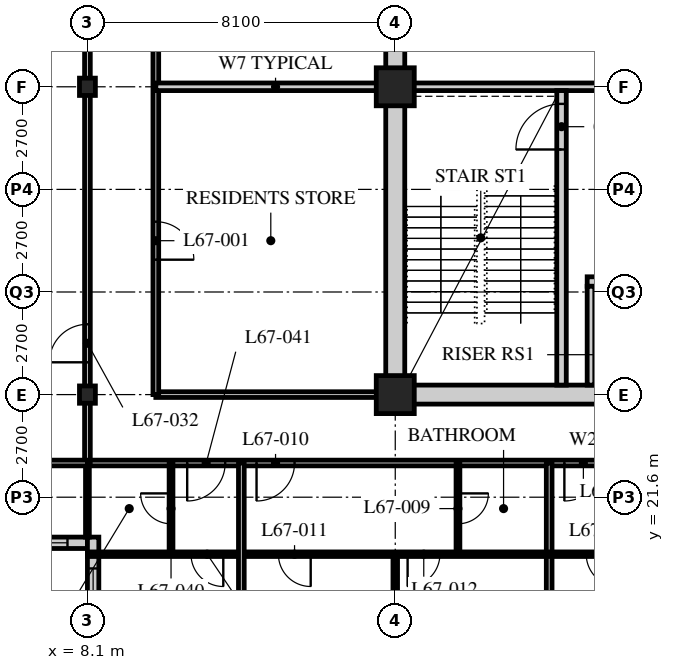
"""IFC4 building model, lengths in metres.
Left out: names, types, materials, properties, quantities, classifications, styles, units other than length and angle.
Written with IfcOpenShell. Run it as: python <this file> out.ifc"""

import sys

from ifc_helpers import new_model, si_unit, direction, frame, frame_2d, origin, origin_2d, place, context, subcontext, project, spatial, rectangle, hollow_rectangle, i_section, extrude, element, fill, save


model = new_model("IFC4")
c1 = context("Model", 3, precision=1e-05, world=origin(), true_north=direction((0.0, 1.0)))
c2 = subcontext(c1, "Body", "Model", "MODEL_VIEW")
j1 = project(units=[si_unit("LENGTHUNIT", "METRE"), si_unit("PLANEANGLEUNIT", "RADIAN")], contexts=[c1])
p1 = place(None, origin())
s1 = spatial("IfcSite", under=j1, at=p1, CompositionType="ELEMENT")
p2 = place(p1, origin())
s2 = spatial("IfcBuilding", under=s1, at=p2, CompositionType="ELEMENT")
p3 = place(p2, frame((0.0, 0.0, 261.9)))
s3 = spatial("IfcBuildingStorey", under=s2, at=p3, CompositionType="ELEMENT", Elevation=261.9)
for number, where, z_axis, x_axis in (
    (1, (8.1, 24.3, 0.0), (0.0, 0.0, 1.0), (1.0, 0.0, 0.0)),
    (2, (8.1, 32.4, 0.0), (0.0, 0.0, 1.0), (1.0, 0.0, 0.0)),
):
    element("IfcColumn", number, at=place(p3, frame(where, z_axis=z_axis, x_axis=x_axis)), inside=s3, PredefinedType="COLUMN", context=c2, shape_type="SweptSolid", body=[
        extrude(i_section(OverallWidth=0.418, OverallDepth=0.456, WebThickness=0.042, FlangeThickness=0.067, FilletRadius=0.015, at=origin_2d()), origin(), (0.0, 0.0, 1.0), 3.9),
    ])
for number, where, z_axis, x_axis in (
    (3, (16.2, 24.3, 0.0), (0.0, 0.0, 1.0), (1.0, 0.0, 0.0)),
    (4, (16.2, 32.4, 0.0), (0.0, 0.0, 1.0), (1.0, 0.0, 0.0)),
):
    element("IfcColumn", number, at=place(p3, frame(where, z_axis=z_axis, x_axis=x_axis)), inside=s3, PredefinedType="COLUMN", context=c2, shape_type="SweptSolid", body=[
        extrude(hollow_rectangle(XDim=1.0, YDim=1.0, WallThickness=0.1, at=origin_2d()), origin(), (0.0, 0.0, 1.0), 3.9),
    ])
p4 = place(p3, frame((4.35, 20.4, 0.0), z_axis=(0.0, 0.0, 1.0), x_axis=(1.0, 0.0, 0.0)))
e5 = element("IfcWall", 5, at=p4, inside=s3, PredefinedType="SOLIDWALL", context=c2, shape_type="SweptSolid", body=[
    extrude(rectangle(XDim=3.75, YDim=0.3, at=frame_2d((1.875, 0.0))), origin(), (0.0, 0.0, 1.0), 3.69),
])
p5 = place(p4, frame((0.225, 0.0, 0.6)))
e6 = element("IfcOpeningElement", 6, at=p5, cuts=e5, PredefinedType="OPENING", context=c2, shape_type="SweptSolid", body=[
    extrude(rectangle(XDim=3.0, YDim=2.3, at=frame_2d((1.5, 1.15))), frame((0.0, 0.16, 0.0), z_axis=(0.0, -1.0, 0.0), x_axis=(1.0, 0.0, 0.0)), (0.0, 0.0, 1.0), 0.32),
])
p6 = place(p3, frame((8.25, 20.55, 0.0), z_axis=(0.0, 0.0, 1.0), x_axis=(0.0, -1.0, 0.0)))
e7 = element("IfcWall", 7, at=p6, inside=s3, PredefinedType="SOLIDWALL", context=c2, shape_type="SweptSolid", body=[
    extrude(rectangle(XDim=4.35, YDim=0.3, at=frame_2d((2.175, 0.0))), origin(), (0.0, 0.0, 1.0), 3.69),
])
p7 = place(p6, frame((0.825, 0.0, 0.6)))
e8 = element("IfcOpeningElement", 8, at=p7, cuts=e7, PredefinedType="OPENING", context=c2, shape_type="SweptSolid", body=[
    extrude(rectangle(XDim=3.0, YDim=2.3, at=frame_2d((1.5, 1.15))), frame((0.0, 0.16, 0.0), z_axis=(0.0, -1.0, 0.0), x_axis=(1.0, 0.0, 0.0)), (0.0, 0.0, 1.0), 0.32),
])
p8 = place(p3, frame((8.1, 22.5, 0.0), z_axis=(0.0, 0.0, 1.0), x_axis=(1.0, 0.0, 0.0)))
e9 = element("IfcWall", 9, at=p8, inside=s3, PredefinedType="PARTITIONING", context=c2, shape_type="SweptSolid", body=[
    extrude(rectangle(XDim=28.35, YDim=0.15, at=frame_2d((14.175, 0.0))), origin(), (0.0, 0.0, 1.0), 3.69),
])
p9 = place(p8, frame((4.45, 0.0, 0.0)))
e10 = element("IfcOpeningElement", 10, at=p9, cuts=e9, PredefinedType="OPENING", context=c2, shape_type="SweptSolid", body=[
    extrude(rectangle(XDim=1.0, YDim=2.1, at=frame_2d((0.5, 1.05))), frame((0.0, 0.085, 0.0), z_axis=(0.0, -1.0, 0.0), x_axis=(1.0, 0.0, 0.0)), (0.0, 0.0, 1.0), 0.17),
])
p10 = place(p8, frame((12.55, 0.0, 0.0)))
e11 = element("IfcOpeningElement", 11, at=p10, cuts=e9, PredefinedType="OPENING", context=c2, shape_type="SweptSolid", body=[
    extrude(rectangle(XDim=1.0, YDim=2.1, at=frame_2d((0.5, 1.05))), frame((0.0, 0.085, 0.0), z_axis=(0.0, -1.0, 0.0), x_axis=(1.0, 0.0, 0.0)), (0.0, 0.0, 1.0), 0.17),
])
p11 = place(p8, frame((20.65, 0.0, 0.0)))
e12 = element("IfcOpeningElement", 12, at=p11, cuts=e9, PredefinedType="OPENING", context=c2, shape_type="SweptSolid", body=[
    extrude(rectangle(XDim=1.0, YDim=2.1, at=frame_2d((0.5, 1.05))), frame((0.0, 0.085, 0.0), z_axis=(0.0, -1.0, 0.0), x_axis=(1.0, 0.0, 0.0)), (0.0, 0.0, 1.0), 0.17),
])
p12 = place(p8, frame((2.625, 0.0, 0.0)))
e13 = element("IfcOpeningElement", 13, at=p12, cuts=e9, PredefinedType="OPENING", context=c2, shape_type="SweptSolid", body=[
    extrude(rectangle(XDim=1.0, YDim=2.1, at=frame_2d((0.5, 1.05))), frame((0.0, 0.085, 0.0), z_axis=(0.0, -1.0, 0.0), x_axis=(1.0, 0.0, 0.0)), (0.0, 0.0, 1.0), 0.17),
])
p13 = place(p3, frame((8.1, 22.5, 0.0), z_axis=(0.0, 0.0, 1.0), x_axis=(0.0, 1.0, 0.0)))
e14 = element("IfcWall", 14, at=p13, inside=s3, PredefinedType="PARTITIONING", context=c2, shape_type="SweptSolid", body=[
    extrude(rectangle(XDim=26.1, YDim=0.15, at=frame_2d((13.05, 0.0))), origin(), (0.0, 0.0, 1.0), 3.078),
])
p14 = place(p13, frame((2.65, 0.0, 0.0)))
e15 = element("IfcOpeningElement", 15, at=p14, cuts=e14, PredefinedType="OPENING", context=c2, shape_type="SweptSolid", body=[
    extrude(rectangle(XDim=1.0, YDim=2.1, at=frame_2d((0.5, 1.05))), frame((0.0, 0.085, 0.0), z_axis=(0.0, -1.0, 0.0), x_axis=(1.0, 0.0, 0.0)), (0.0, 0.0, 1.0), 0.17),
])
p15 = place(p13, frame((22.75, 0.0, 0.0)))
e16 = element("IfcOpeningElement", 16, at=p15, cuts=e14, PredefinedType="OPENING", context=c2, shape_type="SweptSolid", body=[
    extrude(rectangle(XDim=1.0, YDim=2.1, at=frame_2d((0.5, 1.05))), frame((0.0, 0.085, 0.0), z_axis=(0.0, -1.0, 0.0), x_axis=(1.0, 0.0, 0.0)), (0.0, 0.0, 1.0), 0.17),
])
p16 = place(p3, frame((16.0, 24.3, 0.0), z_axis=(0.0, 0.0, 1.0), x_axis=(-1.0, 0.0, 0.0)))
e17 = element("IfcWall", 17, at=p16, inside=s3, PredefinedType="PARTITIONING", context=c2, shape_type="SweptSolid", body=[
    extrude(rectangle(XDim=6.1, YDim=0.15, at=frame_2d((3.05, 0.0))), origin(), (0.0, 0.0, 1.0), 3.078),
])
p17 = place(p3, frame((9.9, 24.3, 0.0), z_axis=(0.0, 0.0, 1.0), x_axis=(0.0, 1.0, 0.0)))
e18 = element("IfcWall", 18, at=p17, inside=s3, PredefinedType="PARTITIONING", context=c2, shape_type="SweptSolid", body=[
    extrude(rectangle(XDim=22.5, YDim=0.15, at=frame_2d((11.25, 0.0))), origin(), (0.0, 0.0, 1.0), 3.69),
])
p18 = place(p17, frame((3.55, 0.0, 0.0)))
e19 = element("IfcOpeningElement", 19, at=p18, cuts=e18, PredefinedType="OPENING", context=c2, shape_type="SweptSolid", body=[
    extrude(rectangle(XDim=1.0, YDim=2.1, at=frame_2d((0.5, 1.05))), frame((0.0, 0.085, 0.0), z_axis=(0.0, -1.0, 0.0), x_axis=(1.0, 0.0, 0.0)), (0.0, 0.0, 1.0), 0.17),
])
p19 = place(p17, frame((11.65, 0.0, 0.0)))
e20 = element("IfcOpeningElement", 20, at=p19, cuts=e18, PredefinedType="OPENING", context=c2, shape_type="SweptSolid", body=[
    extrude(rectangle(XDim=1.0, YDim=2.1, at=frame_2d((0.5, 1.05))), frame((0.0, 0.085, 0.0), z_axis=(0.0, -1.0, 0.0), x_axis=(1.0, 0.0, 0.0)), (0.0, 0.0, 1.0), 0.17),
])
p20 = place(p3, frame((9.9, 32.4, 0.0), z_axis=(0.0, 0.0, 1.0), x_axis=(1.0, 0.0, 0.0)))
e21 = element("IfcWall", 21, at=p20, inside=s3, PredefinedType="SOLIDWALL", context=c2, shape_type="SweptSolid", body=[
    extrude(rectangle(XDim=6.3, YDim=0.2, at=frame_2d((3.15, 0.0))), origin(), (0.0, 0.0, 1.0), 3.078),
])
p21 = place(p3, frame((17.85, 22.5, 0.0), z_axis=(0.0, 0.0, 1.0), x_axis=(0.0, -1.0, 0.0)))
e22 = element("IfcWall", 22, at=p21, inside=s3, PredefinedType="PARTITIONING", context=c2, shape_type="SweptSolid", body=[
    extrude(rectangle(XDim=2.4, YDim=0.1, at=frame_2d((1.2, 0.0))), origin(), (0.0, 0.0, 1.0), 3.69),
])
p22 = place(p21, frame((0.8, 0.0, 0.0)))
e23 = element("IfcOpeningElement", 23, at=p22, cuts=e22, PredefinedType="OPENING", context=c2, shape_type="SweptSolid", body=[
    extrude(rectangle(XDim=0.8, YDim=2.1, at=frame_2d((0.4, 1.05))), frame((0.0, 0.06, 0.0), z_axis=(0.0, -1.0, 0.0), x_axis=(1.0, 0.0, 0.0)), (0.0, 0.0, 1.0), 0.12),
])
p23 = place(p3, frame((16.2, 20.1, 0.0), z_axis=(0.0, 0.0, 1.0), x_axis=(0.0, -1.0, 0.0)))
e24 = element("IfcWall", 24, at=p23, inside=s3, PredefinedType="PARTITIONING", context=c2, shape_type="SweptSolid", body=[
    extrude(rectangle(XDim=3.6, YDim=0.12, at=frame_2d((1.8, 0.0))), origin(), (0.0, 0.0, 1.0), 3.078),
])
p24 = place(p3, frame((20.25, 22.5, 0.0), z_axis=(0.0, 0.0, 1.0), x_axis=(0.0, -1.0, 0.0)))
e25 = element("IfcWall", 25, at=p24, inside=s3, PredefinedType="PARTITIONING", context=c2, shape_type="SweptSolid", body=[
    extrude(rectangle(XDim=6.0, YDim=0.15, at=frame_2d((3.0, 0.0))), origin(), (0.0, 0.0, 1.0), 3.69),
])
p25 = place(p3, frame((8.1, 20.1, 0.0), z_axis=(0.0, 0.0, 1.0), x_axis=(1.0, 0.0, 0.0)))
e26 = element("IfcWall", 26, at=p25, inside=s3, PredefinedType="PARTITIONING", context=c2, shape_type="SweptSolid", body=[
    extrude(rectangle(XDim=28.35, YDim=0.12, at=frame_2d((14.175, 0.0))), origin(), (0.0, 0.0, 1.0), 3.69),
])
p26 = place(p25, frame((5.025, 0.0, 0.0)))
e27 = element("IfcOpeningElement", 27, at=p26, cuts=e26, PredefinedType="OPENING", context=c2, shape_type="SweptSolid", body=[
    extrude(rectangle(XDim=0.85, YDim=2.1, at=frame_2d((0.425, 1.05))), frame((0.0, 0.07, 0.0), z_axis=(0.0, -1.0, 0.0), x_axis=(1.0, 0.0, 0.0)), (0.0, 0.0, 1.0), 0.14),
])
p27 = place(p25, frame((8.425, 0.0, 0.0)))
e28 = element("IfcOpeningElement", 28, at=p27, cuts=e26, PredefinedType="OPENING", context=c2, shape_type="SweptSolid", body=[
    extrude(rectangle(XDim=0.85, YDim=2.1, at=frame_2d((0.425, 1.05))), frame((0.0, 0.07, 0.0), z_axis=(0.0, -1.0, 0.0), x_axis=(1.0, 0.0, 0.0)), (0.0, 0.0, 1.0), 0.14),
])
p28 = place(p25, frame((13.125, 0.0, 0.0)))
e29 = element("IfcOpeningElement", 29, at=p28, cuts=e26, PredefinedType="OPENING", context=c2, shape_type="SweptSolid", body=[
    extrude(rectangle(XDim=0.85, YDim=2.1, at=frame_2d((0.425, 1.05))), frame((0.0, 0.07, 0.0), z_axis=(0.0, -1.0, 0.0), x_axis=(1.0, 0.0, 0.0)), (0.0, 0.0, 1.0), 0.14),
])
p29 = place(p25, frame((16.525, 0.0, 0.0)))
e30 = element("IfcOpeningElement", 30, at=p29, cuts=e26, PredefinedType="OPENING", context=c2, shape_type="SweptSolid", body=[
    extrude(rectangle(XDim=0.85, YDim=2.1, at=frame_2d((0.425, 1.05))), frame((0.0, 0.07, 0.0), z_axis=(0.0, -1.0, 0.0), x_axis=(1.0, 0.0, 0.0)), (0.0, 0.0, 1.0), 0.14),
])
p30 = place(p25, frame((21.225, 0.0, 0.0)))
e31 = element("IfcOpeningElement", 31, at=p30, cuts=e26, PredefinedType="OPENING", context=c2, shape_type="SweptSolid", body=[
    extrude(rectangle(XDim=0.85, YDim=2.1, at=frame_2d((0.425, 1.05))), frame((0.0, 0.07, 0.0), z_axis=(0.0, -1.0, 0.0), x_axis=(1.0, 0.0, 0.0)), (0.0, 0.0, 1.0), 0.14),
])
p31 = place(p25, frame((24.625, 0.0, 0.0)))
e32 = element("IfcOpeningElement", 32, at=p31, cuts=e26, PredefinedType="OPENING", context=c2, shape_type="SweptSolid", body=[
    extrude(rectangle(XDim=0.85, YDim=2.1, at=frame_2d((0.425, 1.05))), frame((0.0, 0.07, 0.0), z_axis=(0.0, -1.0, 0.0), x_axis=(1.0, 0.0, 0.0)), (0.0, 0.0, 1.0), 0.14),
])
p32 = place(p25, frame((2.725, 0.0, 0.0)))
e33 = element("IfcOpeningElement", 33, at=p32, cuts=e26, PredefinedType="OPENING", context=c2, shape_type="SweptSolid", body=[
    extrude(rectangle(XDim=0.85, YDim=2.1, at=frame_2d((0.425, 1.05))), frame((0.0, 0.07, 0.0), z_axis=(0.0, -1.0, 0.0), x_axis=(1.0, 0.0, 0.0)), (0.0, 0.0, 1.0), 0.14),
])
p33 = place(p3, frame((10.3, 22.5, 0.0), z_axis=(0.0, 0.0, 1.0), x_axis=(0.0, -1.0, 0.0)))
e34 = element("IfcWall", 34, at=p33, inside=s3, PredefinedType="PARTITIONING", context=c2, shape_type="SweptSolid", body=[
    extrude(rectangle(XDim=2.4, YDim=0.1, at=frame_2d((1.2, 0.0))), origin(), (0.0, 0.0, 1.0), 3.69),
])
p34 = place(p33, frame((0.8, 0.0, 0.0)))
e35 = element("IfcOpeningElement", 35, at=p34, cuts=e34, PredefinedType="OPENING", context=c2, shape_type="SweptSolid", body=[
    extrude(rectangle(XDim=0.8, YDim=2.1, at=frame_2d((0.4, 1.05))), frame((0.0, 0.06, 0.0), z_axis=(0.0, -1.0, 0.0), x_axis=(1.0, 0.0, 0.0)), (0.0, 0.0, 1.0), 0.12),
])
p35 = place(p3, frame((8.1, 22.5, 0.0), z_axis=(0.0, 0.0, 1.0), x_axis=(0.0, -1.0, 0.0)))
e36 = element("IfcWall", 36, at=p35, inside=s3, PredefinedType="PARTITIONING", context=c2, shape_type="SweptSolid", body=[
    extrude(rectangle(XDim=1.95, YDim=0.1, at=frame_2d((0.975, 0.0))), origin(), (0.0, 0.0, 1.0), 3.078),
])
p36 = place(p3, frame((4.35, 22.5, 0.0), z_axis=(0.0, 0.0, 1.0), x_axis=(1.0, 0.0, 0.0)))
e37 = element("IfcWall", 37, at=p36, inside=s3, PredefinedType="PARTITIONING", context=c2, shape_type="SweptSolid", body=[
    extrude(rectangle(XDim=3.75, YDim=0.15, at=frame_2d((1.875, 0.0))), origin(), (0.0, 0.0, 1.0), 3.69),
])
p37 = place(p3, frame((12.15, 22.5, 0.0), z_axis=(0.0, 0.0, 1.0), x_axis=(0.0, -1.0, 0.0)))
e38 = element("IfcWall", 38, at=p37, inside=s3, PredefinedType="PARTITIONING", context=c2, shape_type="SweptSolid", body=[
    extrude(rectangle(XDim=6.0, YDim=0.15, at=frame_2d((3.0, 0.0))), origin(), (0.0, 0.0, 1.0), 3.69),
])
p38 = place(p3, frame((15.95, 24.3, 0.0), z_axis=(0.0, 0.0, 1.0), x_axis=(1.0, 0.0, 0.0)))
e39 = element("IfcWall", 39, at=p38, inside=s3, PredefinedType="SOLIDWALL", context=c2, shape_type="SweptSolid", body=[
    extrude(rectangle(XDim=24.55, YDim=0.5, at=frame_2d((12.275, 0.0))), origin(), (0.0, 0.0, 1.0), 3.04),
])
p39 = place(p38, frame((11.5, 0.0, 0.0)))
e40 = element("IfcOpeningElement", 40, at=p39, cuts=e39, PredefinedType="OPENING", context=c2, shape_type="SweptSolid", body=[
    extrude(rectangle(XDim=1.8, YDim=2.4, at=frame_2d((0.9, 1.2))), frame((0.0, 0.26, 0.0), z_axis=(0.0, -1.0, 0.0), x_axis=(1.0, 0.0, 0.0)), (0.0, 0.0, 1.0), 0.52),
])
p40 = place(p3, frame((16.2, 24.55, 0.0), z_axis=(0.0, 0.0, 1.0), x_axis=(0.0, 1.0, 0.0)))
e41 = element("IfcWall", 41, at=p40, inside=s3, PredefinedType="SOLIDWALL", context=c2, shape_type="SweptSolid", body=[
    extrude(rectangle(XDim=15.7, YDim=0.5, at=frame_2d((7.85, 0.0))), origin(), (0.0, 0.0, 1.0), 3.078),
])
p41 = place(p3, frame((16.45, 32.4, 0.0), z_axis=(0.0, 0.0, 1.0), x_axis=(1.0, 0.0, 0.0)))
e42 = element("IfcWall", 42, at=p41, inside=s3, PredefinedType="SOLIDWALL", context=c2, shape_type="SweptSolid", body=[
    extrude(rectangle(XDim=7.95, YDim=0.2, at=frame_2d((3.975, 0.0))), origin(), (0.0, 0.0, 1.0), 3.078),
])
p42 = place(p3, frame((20.575, 24.55, 0.0), z_axis=(0.0, 0.0, 1.0), x_axis=(0.0, 1.0, 0.0)))
e43 = element("IfcWall", 43, at=p42, inside=s3, PredefinedType="SOLIDWALL", context=c2, shape_type="SweptSolid", body=[
    extrude(rectangle(XDim=7.75, YDim=0.25, at=frame_2d((3.875, 0.0))), origin(), (0.0, 0.0, 1.0), 3.69),
])
p43 = place(p42, frame((6.2, 0.0, 0.0)))
e44 = element("IfcOpeningElement", 44, at=p43, cuts=e43, PredefinedType="OPENING", context=c2, shape_type="SweptSolid", body=[
    extrude(rectangle(XDim=1.2, YDim=2.1, at=frame_2d((0.6, 1.05))), frame((0.0, 0.135, 0.0), z_axis=(0.0, -1.0, 0.0), x_axis=(1.0, 0.0, 0.0)), (0.0, 0.0, 1.0), 0.27),
])
p44 = place(p3, frame((21.25, 27.275, 0.0), z_axis=(0.0, 0.0, 1.0), x_axis=(1.0, 0.0, 0.0)))
e45 = element("IfcWall", 45, at=p44, inside=s3, PredefinedType="SOLIDWALL", context=c2, shape_type="SweptSolid", body=[
    extrude(rectangle(XDim=2.95, YDim=0.25, at=frame_2d((1.475, 0.0))), origin(), (0.0, 0.0, 1.0), 3.69),
])
p45 = place(p44, frame((0.95, 0.0, 0.0)))
e46 = element("IfcOpeningElement", 46, at=p45, cuts=e45, PredefinedType="OPENING", context=c2, shape_type="SweptSolid", body=[
    extrude(rectangle(XDim=1.1, YDim=2.4, at=frame_2d((0.55, 1.2))), frame((0.0, 0.135, 0.0), z_axis=(0.0, -1.0, 0.0), x_axis=(1.0, 0.0, 0.0)), (0.0, 0.0, 1.0), 0.27),
])
p46 = place(p3, frame((21.35, 24.55, 0.0), z_axis=(0.0, 0.0, 1.0), x_axis=(0.0, 1.0, 0.0)))
e47 = element("IfcWall", 47, at=p46, inside=s3, PredefinedType="SOLIDWALL", context=c2, shape_type="SweptSolid", body=[
    extrude(rectangle(XDim=2.6, YDim=0.2, at=frame_2d((1.3, 0.0))), origin(), (0.0, 0.0, 1.0), 3.69),
])
p47 = place(p5, origin())
e48 = element("IfcWindow", 48, at=p47, inside=s3, PartitioningType="SINGLE_PANEL", PredefinedType="WINDOW", context=c2, shape_type="SweptSolid", body=[
    extrude(rectangle(XDim=3.0, YDim=2.3, at=frame_2d((1.5, 1.15))), frame((0.0, 0.03, 0.0), z_axis=(0.0, -1.0, 0.0), x_axis=(1.0, 0.0, 0.0)), (0.0, 0.0, 1.0), 0.06),
])
fill(e6, e48)
p48 = place(p7, origin())
e49 = element("IfcWindow", 49, at=p48, inside=s3, PartitioningType="SINGLE_PANEL", PredefinedType="WINDOW", context=c2, shape_type="SweptSolid", body=[
    extrude(rectangle(XDim=3.0, YDim=2.3, at=frame_2d((1.5, 1.15))), frame((0.0, 0.03, 0.0), z_axis=(0.0, -1.0, 0.0), x_axis=(1.0, 0.0, 0.0)), (0.0, 0.0, 1.0), 0.06),
])
fill(e8, e49)
p49 = place(p18, origin())
e50 = element("IfcDoor", 50, at=p49, inside=s3, OperationType="SINGLE_SWING_RIGHT", PredefinedType="DOOR", context=c2, shape_type="SweptSolid", body=[
    extrude(rectangle(XDim=1.0, YDim=2.1, at=frame_2d((0.5, 1.05))), frame((0.0, 0.025, 0.0), z_axis=(0.0, -1.0, 0.0), x_axis=(1.0, 0.0, 0.0)), (0.0, 0.0, 1.0), 0.05),
])
fill(e19, e50)
p50 = place(p22, origin())
e51 = element("IfcDoor", 51, at=p50, inside=s3, OperationType="SINGLE_SWING_LEFT", PredefinedType="DOOR", context=c2, shape_type="SweptSolid", body=[
    extrude(rectangle(XDim=0.8, YDim=2.1, at=frame_2d((0.4, 1.05))), frame((0.0, 0.025, 0.0), z_axis=(0.0, -1.0, 0.0), x_axis=(1.0, 0.0, 0.0)), (0.0, 0.0, 1.0), 0.05),
])
fill(e23, e51)
p51 = place(p9, origin())
e52 = element("IfcDoor", 52, at=p51, inside=s3, OperationType="SINGLE_SWING_RIGHT", PredefinedType="DOOR", context=c2, shape_type="SweptSolid", body=[
    extrude(rectangle(XDim=1.0, YDim=2.1, at=frame_2d((0.5, 1.05))), frame((0.0, 0.025, 0.0), z_axis=(0.0, -1.0, 0.0), x_axis=(1.0, 0.0, 0.0)), (0.0, 0.0, 1.0), 0.05),
])
fill(e10, e52)
p52 = place(p26, origin())
e53 = element("IfcDoor", 53, at=p52, inside=s3, OperationType="SINGLE_SWING_LEFT", PredefinedType="DOOR", context=c2, shape_type="SweptSolid", body=[
    extrude(rectangle(XDim=0.85, YDim=2.1, at=frame_2d((0.425, 1.05))), frame((0.0, 0.025, 0.0), z_axis=(0.0, -1.0, 0.0), x_axis=(1.0, 0.0, 0.0)), (0.0, 0.0, 1.0), 0.05),
])
fill(e27, e53)
p53 = place(p27, origin())
e54 = element("IfcDoor", 54, at=p53, inside=s3, OperationType="SINGLE_SWING_RIGHT", PredefinedType="DOOR", context=c2, shape_type="SweptSolid", body=[
    extrude(rectangle(XDim=0.85, YDim=2.1, at=frame_2d((0.425, 1.05))), frame((0.0, 0.025, 0.0), z_axis=(0.0, -1.0, 0.0), x_axis=(1.0, 0.0, 0.0)), (0.0, 0.0, 1.0), 0.05),
])
fill(e28, e54)
p54 = place(p10, origin())
e55 = element("IfcDoor", 55, at=p54, inside=s3, OperationType="SINGLE_SWING_RIGHT", PredefinedType="DOOR", context=c2, shape_type="SweptSolid", body=[
    extrude(rectangle(XDim=1.0, YDim=2.1, at=frame_2d((0.5, 1.05))), frame((0.0, 0.025, 0.0), z_axis=(0.0, -1.0, 0.0), x_axis=(1.0, 0.0, 0.0)), (0.0, 0.0, 1.0), 0.05),
])
fill(e11, e55)
p55 = place(p28, origin())
e56 = element("IfcDoor", 56, at=p55, inside=s3, OperationType="SINGLE_SWING_LEFT", PredefinedType="DOOR", context=c2, shape_type="SweptSolid", body=[
    extrude(rectangle(XDim=0.85, YDim=2.1, at=frame_2d((0.425, 1.05))), frame((0.0, 0.025, 0.0), z_axis=(0.0, -1.0, 0.0), x_axis=(1.0, 0.0, 0.0)), (0.0, 0.0, 1.0), 0.05),
])
fill(e29, e56)
p56 = place(p14, origin())
e57 = element("IfcDoor", 57, at=p56, inside=s3, OperationType="SINGLE_SWING_LEFT", PredefinedType="DOOR", context=c2, shape_type="SweptSolid", body=[
    extrude(rectangle(XDim=1.0, YDim=2.1, at=frame_2d((0.5, 1.05))), frame((0.0, 0.025, 0.0), z_axis=(0.0, -1.0, 0.0), x_axis=(1.0, 0.0, 0.0)), (0.0, 0.0, 1.0), 0.05),
])
fill(e15, e57)
p57 = place(p34, origin())
e58 = element("IfcDoor", 58, at=p57, inside=s3, OperationType="SINGLE_SWING_RIGHT", PredefinedType="DOOR", context=c2, shape_type="SweptSolid", body=[
    extrude(rectangle(XDim=0.8, YDim=2.1, at=frame_2d((0.4, 1.05))), frame((0.0, 0.025, 0.0), z_axis=(0.0, -1.0, 0.0), x_axis=(1.0, 0.0, 0.0)), (0.0, 0.0, 1.0), 0.05),
])
fill(e35, e58)
p58 = place(p12, origin())
e59 = element("IfcDoor", 59, at=p58, inside=s3, OperationType="SINGLE_SWING_RIGHT", PredefinedType="DOOR", context=c2, shape_type="SweptSolid", body=[
    extrude(rectangle(XDim=1.0, YDim=2.1, at=frame_2d((0.5, 1.05))), frame((0.0, 0.025, 0.0), z_axis=(0.0, -1.0, 0.0), x_axis=(1.0, 0.0, 0.0)), (0.0, 0.0, 1.0), 0.05),
])
fill(e13, e59)
p59 = place(p32, origin())
e60 = element("IfcDoor", 60, at=p59, inside=s3, OperationType="SINGLE_SWING_LEFT", PredefinedType="DOOR", context=c2, shape_type="SweptSolid", body=[
    extrude(rectangle(XDim=0.85, YDim=2.1, at=frame_2d((0.425, 1.05))), frame((0.0, 0.025, 0.0), z_axis=(0.0, -1.0, 0.0), x_axis=(1.0, 0.0, 0.0)), (0.0, 0.0, 1.0), 0.05),
])
fill(e33, e60)
p60 = place(p43, origin())
e61 = element("IfcDoor", 61, at=p60, inside=s3, OperationType="SINGLE_SWING_LEFT", PredefinedType="DOOR", context=c2, shape_type="SweptSolid", body=[
    extrude(rectangle(XDim=1.2, YDim=2.1, at=frame_2d((0.6, 1.05))), frame((0.0, 0.025, 0.0), z_axis=(0.0, -1.0, 0.0), x_axis=(1.0, 0.0, 0.0)), (0.0, 0.0, 1.0), 0.05),
])
fill(e44, e61)
save(model, sys.argv[1])
